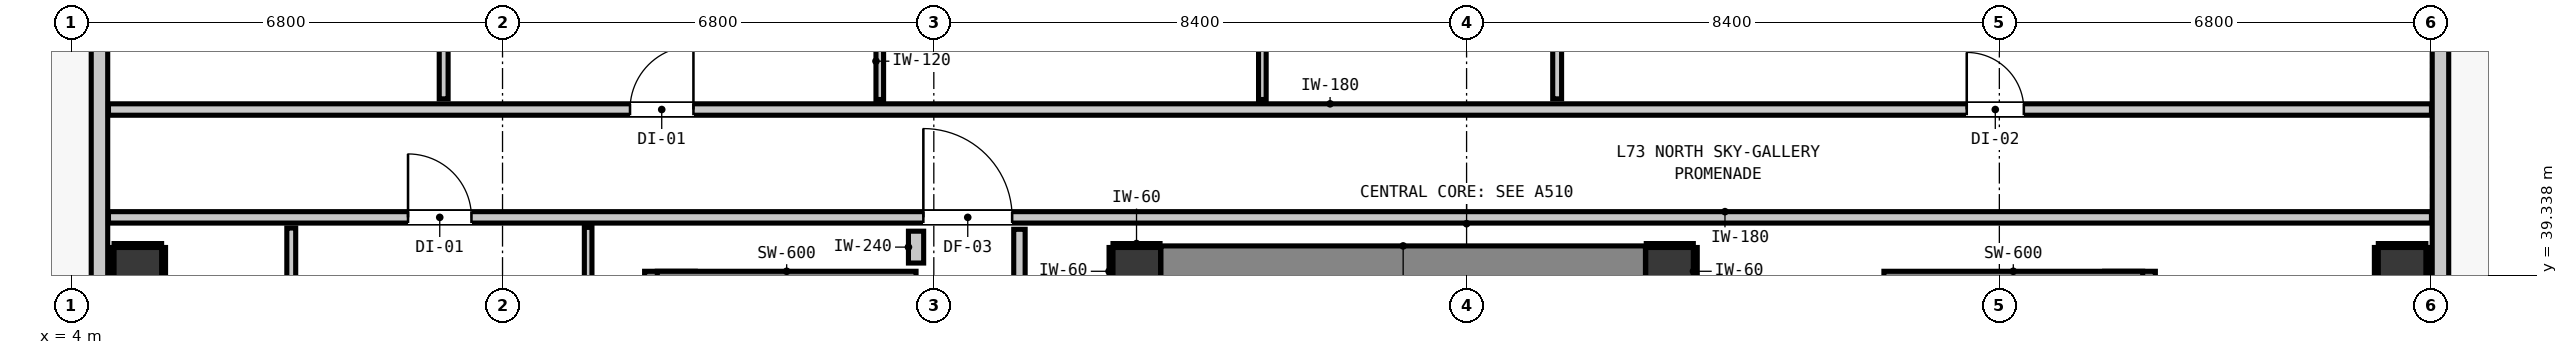
"""IFC4 building model, lengths in metres.
Left out: names, types, materials, properties, quantities, classifications, styles, units other than length and angle.
Written with IfcOpenShell. Run it as: python <this file> out.ifc"""

import sys

from ifc_helpers import new_model, si_unit, direction, frame, frame_2d, origin, origin_2d, place, context, subcontext, project, spatial, rectangle, extrude, element, fill, save


model = new_model("IFC4")
c1 = context("Model", 3, precision=1e-05, world=origin(), true_north=direction((0.0, 1.0)))
c2 = subcontext(c1, "Body", "Model", "MODEL_VIEW")
j1 = project(units=[si_unit("LENGTHUNIT", "METRE"), si_unit("PLANEANGLEUNIT", "RADIAN")], contexts=[c1])
p1 = place(None, origin())
s1 = spatial("IfcSite", under=j1, at=p1, CompositionType="ELEMENT")
p2 = place(p1, origin())
s2 = spatial("IfcBuilding", under=s1, at=p2, CompositionType="ELEMENT")
p3 = place(p2, frame((0.0, 0.0, 251.2)))
s3 = spatial("IfcBuildingStorey", under=s2, at=p3, CompositionType="ELEMENT", Elevation=251.2)
for number, where, z_axis, x_axis in (
    (1, (20.8, 39.4, 0.0), (0.0, 0.0, 1.0), (1.0, 0.0, 0.0)),
    (2, (29.2, 39.4, 0.0), (0.0, 0.0, 1.0), (1.0, 0.0, 0.0)),
):
    element("IfcColumn", number, at=place(p3, frame(where, z_axis=z_axis, x_axis=x_axis)), inside=s3, PredefinedType="COLUMN", context=c2, shape_type="SweptSolid", body=[
        extrude(rectangle(XDim=0.75, YDim=0.75, at=origin_2d()), origin(), (0.0, 0.0, 1.0), 3.32),
    ])
p4 = place(p3, frame((13.44, 31.08, 0.0), z_axis=(0.0, 0.0, 1.0), x_axis=(0.0, 1.0, 0.0)))
e3 = element("IfcWall", 3, at=p4, inside=s3, PredefinedType="SHEAR", context=c2, shape_type="SweptSolid", body=[
    extrude(rectangle(XDim=8.32, YDim=0.8, at=frame_2d((4.16, 0.0))), origin(), (0.0, 0.0, 1.0), 3.32),
])
p5 = place(p3, frame((13.24, 39.1, 0.0), z_axis=(0.0, 0.0, 1.0), x_axis=(1.0, 0.0, 0.0)))
e4 = element("IfcWall", 4, at=p5, inside=s3, PredefinedType="SHEAR", context=c2, shape_type="SweptSolid", body=[
    extrude(rectangle(XDim=4.08, YDim=0.6, at=frame_2d((2.04, 0.0))), origin(), (0.0, 0.0, 1.0), 3.32),
])
p6 = place(p3, frame((36.46, 31.08, 0.0), z_axis=(0.0, 0.0, 1.0), x_axis=(0.0, 1.0, 0.0)))
e5 = element("IfcWall", 5, at=p6, inside=s3, PredefinedType="SHEAR", context=c2, shape_type="SweptSolid", body=[
    extrude(rectangle(XDim=8.32, YDim=0.8, at=frame_2d((4.16, 0.0))), origin(), (0.0, 0.0, 1.0), 3.32),
])
p7 = place(p3, frame((32.58, 39.1, 0.0), z_axis=(0.0, 0.0, 1.0), x_axis=(1.0, 0.0, 0.0)))
e6 = element("IfcWall", 6, at=p7, inside=s3, PredefinedType="SHEAR", context=c2, shape_type="SweptSolid", body=[
    extrude(rectangle(XDim=4.08, YDim=0.6, at=frame_2d((2.04, 0.0))), origin(), (0.0, 0.0, 1.0), 3.32),
])
p8 = place(p3, frame((21.18, 39.4, 0.0), z_axis=(0.0, 0.0, 1.0), x_axis=(1.0, 0.0, 0.0)))
e7 = element("IfcWall", 7, at=p8, inside=s3, PredefinedType="SHEAR", context=c2, shape_type="SweptSolid", body=[
    extrude(rectangle(XDim=7.64, YDim=0.8, at=frame_2d((3.82, 0.0))), origin(), (0.0, 0.0, 1.0), 3.32),
])
for number, where, z_axis, x_axis in (
    (8, (5.05, 39.4, -0.2), (0.0, 0.0, 1.0), (1.0, 0.0, 0.0)),
    (9, (40.75, 39.4, -0.2), (0.0, 0.0, 1.0), (1.0, 0.0, 0.0)),
):
    element("IfcColumn", number, at=place(p3, frame(where, z_axis=z_axis, x_axis=x_axis)), inside=s3, PredefinedType="COLUMN", context=c2, shape_type="SweptSolid", body=[
        extrude(rectangle(XDim=0.75, YDim=0.75, at=origin_2d()), origin(), (0.0, 0.0, 1.0), 3.52),
    ])
p9 = place(p3, frame((4.445, 18.545, 0.0), z_axis=(0.0, 0.0, 1.0), x_axis=(0.0, 1.0, 0.0)))
e10 = element("IfcWall", 10, at=p9, inside=s3, PredefinedType="STANDARD", context=c2, shape_type="SweptSolid", body=[
    extrude(rectangle(XDim=30.31, YDim=0.26, at=frame_2d((15.155, 0.0))), origin(), (0.0, 0.0, 1.0), 3.1),
])
p10 = place(p9, frame((4.434, 0.0, 0.0)))
e11 = element("IfcOpeningElement", 11, at=p10, cuts=e10, PredefinedType="OPENING", context=c2, shape_type="SweptSolid", body=[
    extrude(rectangle(XDim=1.0, YDim=2.15, at=frame_2d((0.5, 1.075))), frame((0.0, 0.14, 0.0), z_axis=(0.0, -1.0, 0.0), x_axis=(1.0, 0.0, 0.0)), (0.0, 0.0, 1.0), 0.28),
])
p11 = place(p9, frame((27.866, 0.0, 0.85)))
e12 = element("IfcOpeningElement", 12, at=p11, cuts=e10, PredefinedType="OPENING", context=c2, shape_type="SweptSolid", body=[
    extrude(rectangle(XDim=1.8, YDim=1.9, at=frame_2d((0.9, 0.95))), frame((0.0, 0.14, 0.0), z_axis=(0.0, -1.0, 0.0), x_axis=(1.0, 0.0, 0.0)), (0.0, 0.0, 1.0), 0.28),
])
p12 = place(p3, frame((41.355, 48.855, 0.0), z_axis=(0.0, 0.0, 1.0), x_axis=(0.0, -1.0, 0.0)))
e13 = element("IfcWall", 13, at=p12, inside=s3, PredefinedType="STANDARD", context=c2, shape_type="SweptSolid", body=[
    extrude(rectangle(XDim=30.31, YDim=0.26, at=frame_2d((15.155, 0.0))), origin(), (0.0, 0.0, 1.0), 3.1),
])
p13 = place(p12, frame((0.507, 0.0, 0.0)))
e14 = element("IfcOpeningElement", 14, at=p13, cuts=e13, PredefinedType="OPENING", context=c2, shape_type="SweptSolid", body=[
    extrude(rectangle(XDim=1.1, YDim=2.15, at=frame_2d((0.55, 1.075))), frame((0.0, 0.14, 0.0), z_axis=(0.0, -1.0, 0.0), x_axis=(1.0, 0.0, 0.0)), (0.0, 0.0, 1.0), 0.28),
])
p14 = place(p12, frame((3.406, 0.0, 0.85)))
e15 = element("IfcOpeningElement", 15, at=p14, cuts=e13, PredefinedType="OPENING", context=c2, shape_type="SweptSolid", body=[
    extrude(rectangle(XDim=1.8, YDim=1.9, at=frame_2d((0.9, 0.95))), frame((0.0, 0.14, 0.0), z_axis=(0.0, -1.0, 0.0), x_axis=(1.0, 0.0, 0.0)), (0.0, 0.0, 1.0), 0.28),
])
p15 = place(p3, frame((4.587, 40.25, 0.0), z_axis=(0.0, 0.0, 1.0), x_axis=(1.0, 0.0, 0.0)))
e16 = element("IfcWall", 16, at=p15, inside=s3, PredefinedType="PARTITIONING", context=c2, shape_type="SweptSolid", body=[
    extrude(rectangle(XDim=36.626, YDim=0.18, at=frame_2d((18.313, 0.0))), origin(), (0.0, 0.0, 1.0), 3.1),
])
p16 = place(p15, frame((12.848, 0.0, 0.0)))
e17 = element("IfcOpeningElement", 17, at=p16, cuts=e16, PredefinedType="OPENING", context=c2, shape_type="SweptSolid", body=[
    extrude(rectangle(XDim=1.4, YDim=2.15, at=frame_2d((0.7, 1.075))), frame((0.0, 0.1, 0.0), z_axis=(0.0, -1.0, 0.0), x_axis=(1.0, 0.0, 0.0)), (0.0, 0.0, 1.0), 0.2),
])
p17 = place(p15, frame((4.723, 0.0, 0.0)))
e18 = element("IfcOpeningElement", 18, at=p17, cuts=e16, PredefinedType="OPENING", context=c2, shape_type="SweptSolid", body=[
    extrude(rectangle(XDim=1.0, YDim=2.15, at=frame_2d((0.5, 1.075))), frame((0.0, 0.1, 0.0), z_axis=(0.0, -1.0, 0.0), x_axis=(1.0, 0.0, 0.0)), (0.0, 0.0, 1.0), 0.2),
])
p18 = place(p3, frame((4.587, 41.95, 0.0), z_axis=(0.0, 0.0, 1.0), x_axis=(1.0, 0.0, 0.0)))
e19 = element("IfcWall", 19, at=p18, inside=s3, PredefinedType="PARTITIONING", context=c2, shape_type="SweptSolid", body=[
    extrude(rectangle(XDim=36.626, YDim=0.18, at=frame_2d((18.313, 0.0))), origin(), (0.0, 0.0, 1.0), 3.1),
])
p19 = place(p18, frame((8.223, 0.0, 0.0)))
e20 = element("IfcOpeningElement", 20, at=p19, cuts=e19, PredefinedType="OPENING", context=c2, shape_type="SweptSolid", body=[
    extrude(rectangle(XDim=1.0, YDim=2.15, at=frame_2d((0.5, 1.075))), frame((0.0, 0.1, 0.0), z_axis=(0.0, -1.0, 0.0), x_axis=(1.0, 0.0, 0.0)), (0.0, 0.0, 1.0), 0.2),
])
p20 = place(p18, frame((29.299, 0.0, 0.0)))
e21 = element("IfcOpeningElement", 21, at=p20, cuts=e19, PredefinedType="OPENING", context=c2, shape_type="SweptSolid", body=[
    extrude(rectangle(XDim=0.9, YDim=2.1, at=frame_2d((0.45, 1.05))), frame((0.0, 0.1, 0.0), z_axis=(0.0, -1.0, 0.0), x_axis=(1.0, 0.0, 0.0)), (0.0, 0.0, 1.0), 0.2),
])
p21 = place(p3, frame((17.32, 39.53, 0.0), z_axis=(0.0, 0.0, 1.0), x_axis=(0.0, 1.0, 0.0)))
e22 = element("IfcWall", 22, at=p21, inside=s3, PredefinedType="PARTITIONING", context=c2, shape_type="SweptSolid", body=[
    extrude(rectangle(XDim=0.502, YDim=0.24, at=frame_2d((0.251, 0.0))), origin(), (0.0, 0.0, 1.0), 3.1),
])
p22 = place(p3, frame((18.95, 39.058, 0.0), z_axis=(0.0, 0.0, 1.0), x_axis=(0.0, 1.0, 0.0)))
e23 = element("IfcWall", 23, at=p22, inside=s3, PredefinedType="PARTITIONING", context=c2, shape_type="SweptSolid", body=[
    extrude(rectangle(XDim=1.004, YDim=0.18, at=frame_2d((0.502, 0.0))), origin(), (0.0, 0.0, 1.0), 3.1),
])
p23 = place(p3, frame((7.469, 36.635, 0.0), z_axis=(0.0, 0.0, 1.0), x_axis=(0.0, 1.0, 0.0)))
e24 = element("IfcWall", 24, at=p23, inside=s3, PredefinedType="PARTITIONING", context=c2, shape_type="SweptSolid", body=[
    extrude(rectangle(XDim=3.447, YDim=0.14, at=frame_2d((1.724, 0.0))), origin(), (0.0, 0.0, 1.0), 3.1),
])
p24 = place(p23, frame((1.271, 0.0, 0.0)))
e25 = element("IfcOpeningElement", 25, at=p24, cuts=e24, PredefinedType="OPENING", context=c2, shape_type="SweptSolid", body=[
    extrude(rectangle(XDim=0.9, YDim=2.1, at=frame_2d((0.45, 1.05))), frame((0.0, 0.08, 0.0), z_axis=(0.0, -1.0, 0.0), x_axis=(1.0, 0.0, 0.0)), (0.0, 0.0, 1.0), 0.16),
])
p25 = place(p3, frame((9.872, 42.118, 0.0), z_axis=(0.0, 0.0, 1.0), x_axis=(0.0, 1.0, 0.0)))
e26 = element("IfcWall", 26, at=p25, inside=s3, PredefinedType="PARTITIONING", context=c2, shape_type="SweptSolid", body=[
    extrude(rectangle(XDim=3.49, YDim=0.14, at=frame_2d((1.745, 0.0))), origin(), (0.0, 0.0, 1.0), 3.1),
])
p26 = place(p25, frame((1.318, 0.0, 0.0)))
e27 = element("IfcOpeningElement", 27, at=p26, cuts=e26, PredefinedType="OPENING", context=c2, shape_type="SweptSolid", body=[
    extrude(rectangle(XDim=0.86, YDim=2.02, at=frame_2d((0.43, 1.01))), frame((0.0, 0.08, 0.0), z_axis=(0.0, -1.0, 0.0), x_axis=(1.0, 0.0, 0.0)), (0.0, 0.0, 1.0), 0.16),
])
p27 = place(p3, frame((27.428, 42.118, 0.0), z_axis=(0.0, 0.0, 1.0), x_axis=(0.0, 1.0, 0.0)))
e28 = element("IfcWall", 28, at=p27, inside=s3, PredefinedType="PARTITIONING", context=c2, shape_type="SweptSolid", body=[
    extrude(rectangle(XDim=3.49, YDim=0.14, at=frame_2d((1.745, 0.0))), origin(), (0.0, 0.0, 1.0), 3.1),
])
p28 = place(p3, frame((12.15, 31.808, 0.0), z_axis=(0.0, 0.0, 1.0), x_axis=(0.0, 1.0, 0.0)))
e29 = element("IfcWall", 29, at=p28, inside=s3, PredefinedType="PARTITIONING", context=c2, shape_type="SweptSolid", body=[
    extrude(rectangle(XDim=8.284, YDim=0.12, at=frame_2d((4.142, 0.0))), origin(), (0.0, 0.0, 1.0), 3.1),
])
p29 = place(p3, frame((16.748, 42.108, 0.0), z_axis=(0.0, 0.0, 1.0), x_axis=(0.0, 1.0, 0.0)))
e30 = element("IfcWall", 30, at=p29, inside=s3, PredefinedType="PARTITIONING", context=c2, shape_type="SweptSolid", body=[
    extrude(rectangle(XDim=3.51, YDim=0.12, at=frame_2d((1.755, 0.0))), origin(), (0.0, 0.0, 1.0), 3.1),
])
p30 = place(p29, frame((1.308, 0.0, 0.0)))
e31 = element("IfcOpeningElement", 31, at=p30, cuts=e30, PredefinedType="OPENING", context=c2, shape_type="SweptSolid", body=[
    extrude(rectangle(XDim=0.9, YDim=2.1, at=frame_2d((0.45, 1.05))), frame((0.0, 0.07, 0.0), z_axis=(0.0, -1.0, 0.0), x_axis=(1.0, 0.0, 0.0)), (0.0, 0.0, 1.0), 0.14),
])
p31 = place(p3, frame((22.78, 42.108, 0.0), z_axis=(0.0, 0.0, 1.0), x_axis=(0.0, 1.0, 0.0)))
e32 = element("IfcWall", 32, at=p31, inside=s3, PredefinedType="PARTITIONING", context=c2, shape_type="SweptSolid", body=[
    extrude(rectangle(XDim=3.51, YDim=0.12, at=frame_2d((1.755, 0.0))), origin(), (0.0, 0.0, 1.0), 3.1),
])
p32 = place(p31, frame((1.295, 0.0, 0.0)))
e33 = element("IfcOpeningElement", 33, at=p32, cuts=e32, PredefinedType="OPENING", context=c2, shape_type="SweptSolid", body=[
    extrude(rectangle(XDim=0.9, YDim=2.1, at=frame_2d((0.45, 1.05))), frame((0.0, 0.07, 0.0), z_axis=(0.0, -1.0, 0.0), x_axis=(1.0, 0.0, 0.0)), (0.0, 0.0, 1.0), 0.14),
])
p33 = place(p3, frame((20.425, 39.807, 0.0), z_axis=(0.0, 0.0, 1.0), x_axis=(1.0, 0.0, 0.0)))
e34 = element("IfcWall", 34, at=p33, inside=s3, PredefinedType="PARTITIONING", context=c2, shape_type="SweptSolid", body=[
    extrude(rectangle(XDim=0.742, YDim=0.06, at=frame_2d((0.371, 0.0))), origin(), (0.0, 0.0, 1.0), 1.45),
])
p34 = place(p3, frame((20.393, 39.025, 0.0), z_axis=(0.0, 0.0, 1.0), x_axis=(0.0, 1.0, 0.0)))
e35 = element("IfcWall", 35, at=p34, inside=s3, PredefinedType="PARTITIONING", context=c2, shape_type="SweptSolid", body=[
    extrude(rectangle(XDim=0.75, YDim=0.06, at=frame_2d((0.375, 0.0))), origin(), (0.0, 0.0, 1.0), 1.45),
])
p35 = place(p3, frame((28.833, 39.807, 0.0), z_axis=(0.0, 0.0, 1.0), x_axis=(1.0, 0.0, 0.0)))
e36 = element("IfcWall", 36, at=p35, inside=s3, PredefinedType="PARTITIONING", context=c2, shape_type="SweptSolid", body=[
    extrude(rectangle(XDim=0.742, YDim=0.06, at=frame_2d((0.371, 0.0))), origin(), (0.0, 0.0, 1.0), 1.45),
])
for number, where, z_axis, x_axis in (
    (37, (29.607, 39.025, 0.0), (0.0, 0.0, 1.0), (0.0, 1.0, 0.0)),
    (38, (4.675, 39.807, 0.0), (0.0, 0.0, 1.0), (1.0, 0.0, 0.0)),
    (39, (4.643, 39.025, 0.0), (0.0, 0.0, 1.0), (0.0, 1.0, 0.0)),
    (40, (5.457, 39.025, 0.0), (0.0, 0.0, 1.0), (0.0, 1.0, 0.0)),
    (41, (40.375, 39.807, 0.0), (0.0, 0.0, 1.0), (1.0, 0.0, 0.0)),
    (42, (40.343, 39.025, 0.0), (0.0, 0.0, 1.0), (0.0, 1.0, 0.0)),
    (43, (41.157, 39.025, 0.0), (0.0, 0.0, 1.0), (0.0, 1.0, 0.0)),
):
    element("IfcWall", number, at=place(p3, frame(where, z_axis=z_axis, x_axis=x_axis)), inside=s3, PredefinedType="PARTITIONING", context=c2, shape_type="SweptSolid", body=[
        extrude(rectangle(XDim=0.75, YDim=0.06, at=frame_2d((0.375, 0.0))), origin(), (0.0, 0.0, 1.0), 1.45),
    ])
p36 = place(p16, origin())
e44 = element("IfcDoor", 44, at=p36, inside=s3, OperationType="SINGLE_SWING_LEFT", PredefinedType="DOOR", context=c2, shape_type="SweptSolid", body=[
    extrude(rectangle(XDim=1.4, YDim=2.15, at=frame_2d((0.7, 1.075))), frame((0.0, 0.025, 0.0), z_axis=(0.0, -1.0, 0.0), x_axis=(1.0, 0.0, 0.0)), (0.0, 0.0, 1.0), 0.05),
])
fill(e17, e44)
p37 = place(p19, origin())
e45 = element("IfcDoor", 45, at=p37, inside=s3, OperationType="SINGLE_SWING_RIGHT", PredefinedType="DOOR", context=c2, shape_type="SweptSolid", body=[
    extrude(rectangle(XDim=1.0, YDim=2.15, at=frame_2d((0.5, 1.075))), frame((0.0, 0.025, 0.0), z_axis=(0.0, -1.0, 0.0), x_axis=(1.0, 0.0, 0.0)), (0.0, 0.0, 1.0), 0.05),
])
fill(e20, e45)
p38 = place(p20, origin())
e46 = element("IfcDoor", 46, at=p38, inside=s3, OperationType="SINGLE_SWING_LEFT", PredefinedType="DOOR", context=c2, shape_type="SweptSolid", body=[
    extrude(rectangle(XDim=0.9, YDim=2.1, at=frame_2d((0.45, 1.05))), frame((0.0, 0.025, 0.0), z_axis=(0.0, -1.0, 0.0), x_axis=(1.0, 0.0, 0.0)), (0.0, 0.0, 1.0), 0.05),
])
fill(e21, e46)
p39 = place(p17, origin())
e47 = element("IfcDoor", 47, at=p39, inside=s3, OperationType="SINGLE_SWING_LEFT", PredefinedType="DOOR", context=c2, shape_type="SweptSolid", body=[
    extrude(rectangle(XDim=1.0, YDim=2.15, at=frame_2d((0.5, 1.075))), frame((0.0, 0.025, 0.0), z_axis=(0.0, -1.0, 0.0), x_axis=(1.0, 0.0, 0.0)), (0.0, 0.0, 1.0), 0.05),
])
fill(e18, e47)
save(model, sys.argv[1])
